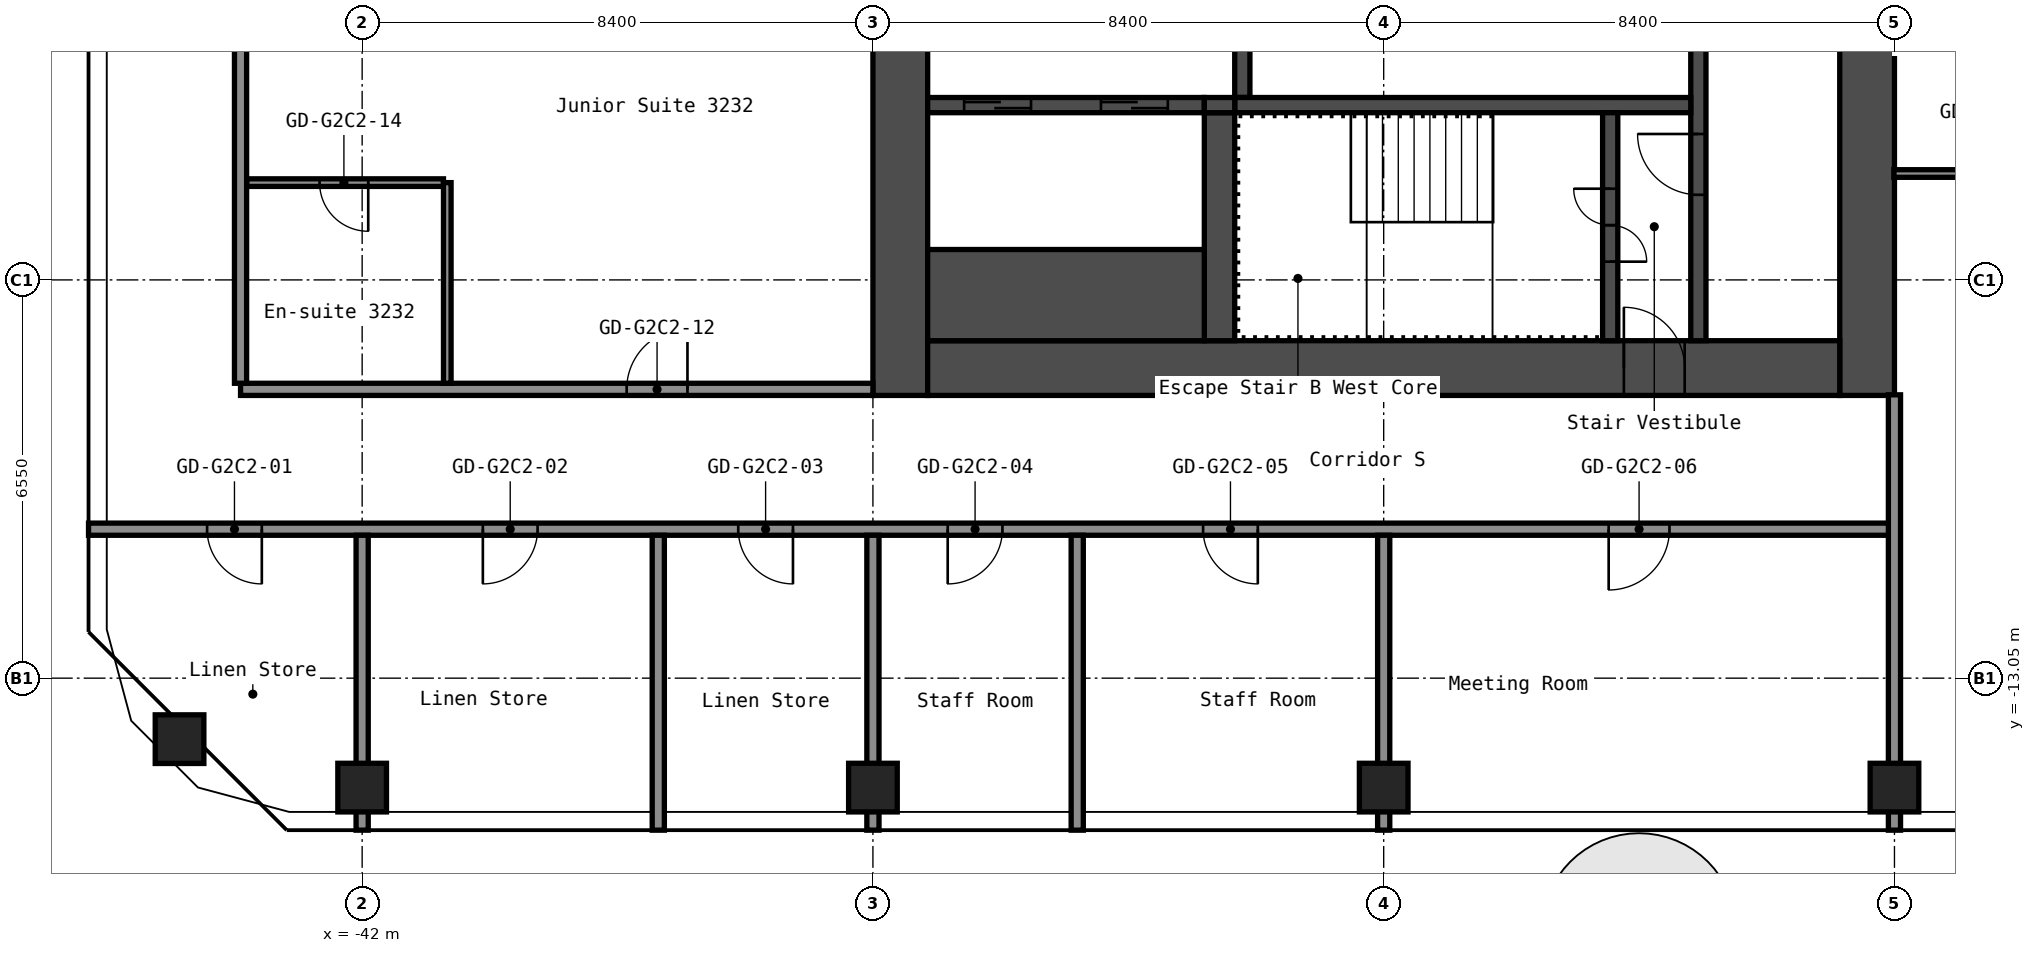
"""IFC4 building model, lengths in metres.
Left out: names, types, materials, properties, quantities, classifications, styles, units other than length and angle.
Written with IfcOpenShell. Run it as: python <this file> out.ifc"""

import sys

from ifc_helpers import new_model, si_unit, direction, frame, frame_2d, origin, origin_2d, place, context, subcontext, project, spatial, rectangle, hollow_rectangle, extrude, element, fill, save


model = new_model("IFC4")
c1 = context("Model", 3, precision=1e-05, world=origin(), true_north=direction((0.0, 1.0)))
c2 = subcontext(c1, "Body", "Model", "MODEL_VIEW")
j1 = project(units=[si_unit("LENGTHUNIT", "METRE"), si_unit("PLANEANGLEUNIT", "RADIAN")], contexts=[c1])
p1 = place(None, origin())
s1 = spatial("IfcSite", under=j1, at=p1, CompositionType="ELEMENT")
p2 = place(p1, origin())
s2 = spatial("IfcBuilding", under=s1, at=p2, CompositionType="ELEMENT")
p3 = place(p2, frame((0.0, 0.0, 113.8)))
s3 = spatial("IfcBuildingStorey", under=s2, at=p3, CompositionType="ELEMENT", Elevation=113.8)
for number, where, z_axis, x_axis in (
    (1, (-45.003, -14.053, 0.0), (0.0, 0.0, 1.0), (1.0, 0.0, 0.0)),
    (2, (-42.0, -14.85, 0.0), (0.0, 0.0, 1.0), (1.0, 0.0, 0.0)),
    (3, (-33.6, -14.85, 0.0), (0.0, 0.0, 1.0), (1.0, 0.0, 0.0)),
    (4, (-25.2, -14.85, 0.0), (0.0, 0.0, 1.0), (1.0, 0.0, 0.0)),
    (5, (-16.8, -14.85, 0.0), (0.0, 0.0, 1.0), (1.0, 0.0, 0.0)),
):
    element("IfcColumn", number, at=place(p3, frame(where, z_axis=z_axis, x_axis=x_axis)), inside=s3, PredefinedType="COLUMN", context=c2, shape_type="SweptSolid", body=[
        extrude(hollow_rectangle(XDim=0.8, YDim=0.8, WallThickness=0.032, at=origin_2d()), origin(), (0.0, 0.0, 1.0), 2.8),
    ])
p4 = place(p3, frame((-17.25, -8.4, 0.0), z_axis=(0.0, 0.0, 1.0), x_axis=(0.0, 1.0, 0.0)))
e6 = element("IfcWall", 6, at=p4, inside=s3, PredefinedType="SHEAR", context=c2, shape_type="SweptSolid", body=[
    extrude(rectangle(XDim=16.8, YDim=0.9, at=frame_2d((8.4, 0.0))), origin(), (0.0, 0.0, 1.0), 2.8),
])
p5 = place(p4, frame((7.6, 0.0, 0.0)))
e7 = element("IfcOpeningElement", 7, at=p5, cuts=e6, PredefinedType="OPENING", context=c2, shape_type="SweptSolid", body=[
    extrude(rectangle(XDim=1.2, YDim=2.1, at=frame_2d((0.6, 1.05))), frame((0.0, 0.46, 0.0), z_axis=(0.0, -1.0, 0.0), x_axis=(1.0, 0.0, 0.0)), (0.0, 0.0, 1.0), 0.92),
])
p6 = place(p3, frame((-33.15, -8.4, 0.0), z_axis=(0.0, 0.0, 1.0), x_axis=(0.0, 1.0, 0.0)))
e8 = element("IfcWall", 8, at=p6, inside=s3, PredefinedType="SHEAR", context=c2, shape_type="SweptSolid", body=[
    extrude(rectangle(XDim=16.8, YDim=0.9, at=frame_2d((8.4, 0.0))), origin(), (0.0, 0.0, 1.0), 2.8),
])
p7 = place(p3, frame((-32.7, -7.95, 0.0), z_axis=(0.0, 0.0, 1.0), x_axis=(1.0, 0.0, 0.0)))
e9 = element("IfcWall", 9, at=p7, inside=s3, PredefinedType="SHEAR", context=c2, shape_type="SweptSolid", body=[
    extrude(rectangle(XDim=15.0, YDim=0.9, at=frame_2d((7.5, 0.0))), origin(), (0.0, 0.0, 1.0), 2.8),
])
p8 = place(p7, frame((11.45, 0.0, 0.0)))
e10 = element("IfcOpeningElement", 10, at=p8, cuts=e9, PredefinedType="OPENING", context=c2, shape_type="SweptSolid", body=[
    extrude(rectangle(XDim=1.0, YDim=2.1, at=frame_2d((0.5, 1.05))), frame((0.0, 0.46, 0.0), z_axis=(0.0, -1.0, 0.0), x_axis=(1.0, 0.0, 0.0)), (0.0, 0.0, 1.0), 0.92),
])
p9 = place(p3, frame((-20.025, -7.5, 0.0), z_axis=(0.0, 0.0, 1.0), x_axis=(0.0, 1.0, 0.0)))
e11 = element("IfcWall", 11, at=p9, inside=s3, PredefinedType="SHEAR", context=c2, shape_type="SweptSolid", body=[
    extrude(rectangle(XDim=6.3, YDim=0.25, at=frame_2d((3.15, 0.0))), origin(), (0.0, 0.0, 1.0), 2.8),
])
p10 = place(p9, frame((2.4, 0.0, 0.0)))
e12 = element("IfcOpeningElement", 12, at=p10, cuts=e11, PredefinedType="OPENING", context=c2, shape_type="SweptSolid", body=[
    extrude(rectangle(XDim=1.0, YDim=2.1, at=frame_2d((0.5, 1.05))), frame((0.0, 0.135, 0.0), z_axis=(0.0, -1.0, 0.0), x_axis=(1.0, 0.0, 0.0)), (0.0, 0.0, 1.0), 0.27),
])
p11 = place(p3, frame((-27.525, -3.5, 0.0), z_axis=(0.0, 0.0, 1.0), x_axis=(0.0, 1.0, 0.0)))
e13 = element("IfcWall", 13, at=p11, inside=s3, PredefinedType="SHEAR", context=c2, shape_type="SweptSolid", body=[
    extrude(rectangle(XDim=2.05, YDim=0.25, at=frame_2d((1.025, 0.0))), origin(), (0.0, 0.0, 1.0), 2.8),
])
p12 = place(p3, frame((-27.65, -3.625, 0.0), z_axis=(0.0, 0.0, 1.0), x_axis=(1.0, 0.0, 0.0)))
e14 = element("IfcWall", 14, at=p12, inside=s3, PredefinedType="SHEAR", context=c2, shape_type="SweptSolid", body=[
    extrude(rectangle(XDim=7.5, YDim=0.25, at=frame_2d((3.75, 0.0))), origin(), (0.0, 0.0, 1.0), 2.8),
])
p13 = place(p3, frame((-21.475, -7.5, 0.0), z_axis=(0.0, 0.0, 1.0), x_axis=(0.0, 1.0, 0.0)))
e15 = element("IfcWall", 15, at=p13, inside=s3, PredefinedType="SHEAR", context=c2, shape_type="SweptSolid", body=[
    extrude(rectangle(XDim=3.75, YDim=0.25, at=frame_2d((1.875, 0.0))), origin(), (0.0, 0.0, 1.0), 2.8),
])
p14 = place(p13, frame((1.3, 0.0, 0.0)))
e16 = element("IfcOpeningElement", 16, at=p14, cuts=e15, PredefinedType="OPENING", context=c2, shape_type="SweptSolid", body=[
    extrude(rectangle(XDim=1.2, YDim=2.1, at=frame_2d((0.6, 1.05))), frame((0.0, 0.135, 0.0), z_axis=(0.0, -1.0, 0.0), x_axis=(1.0, 0.0, 0.0)), (0.0, 0.0, 1.0), 0.27),
])
p15 = place(p3, frame((-27.9, -7.5, 0.0), z_axis=(0.0, 0.0, 1.0), x_axis=(0.0, 1.0, 0.0)))
e17 = element("IfcWall", 17, at=p15, inside=s3, PredefinedType="SHEAR", context=c2, shape_type="SweptSolid", body=[
    extrude(rectangle(XDim=3.75, YDim=0.5, at=frame_2d((1.875, 0.0))), origin(), (0.0, 0.0, 1.0), 2.8),
])
p16 = place(p3, frame((-32.7, -3.625, 0.0), z_axis=(0.0, 0.0, 1.0), x_axis=(1.0, 0.0, 0.0)))
e18 = element("IfcWall", 18, at=p16, inside=s3, PredefinedType="SHEAR", context=c2, shape_type="SweptSolid", body=[
    extrude(rectangle(XDim=4.55, YDim=0.25, at=frame_2d((2.275, 0.0))), origin(), (0.0, 0.0, 1.0), 2.8),
])
p17 = place(p16, frame((2.85, 0.0, 0.0)))
e19 = element("IfcOpeningElement", 19, at=p17, cuts=e18, PredefinedType="OPENING", context=c2, shape_type="SweptSolid", body=[
    extrude(rectangle(XDim=1.1, YDim=2.1, at=frame_2d((0.55, 1.05))), frame((0.0, 0.135, 0.0), z_axis=(0.0, -1.0, 0.0), x_axis=(1.0, 0.0, 0.0)), (0.0, 0.0, 1.0), 0.27),
])
p18 = place(p16, frame((0.6, 0.0, 0.0)))
e20 = element("IfcOpeningElement", 20, at=p18, cuts=e18, PredefinedType="OPENING", context=c2, shape_type="SweptSolid", body=[
    extrude(rectangle(XDim=1.1, YDim=2.1, at=frame_2d((0.55, 1.05))), frame((0.0, 0.135, 0.0), z_axis=(0.0, -1.0, 0.0), x_axis=(1.0, 0.0, 0.0)), (0.0, 0.0, 1.0), 0.27),
])
p19 = place(p3, frame((-32.7, -6.75, 0.0), z_axis=(0.0, 0.0, 1.0), x_axis=(1.0, 0.0, 0.0)))
e21 = element("IfcWall", 21, at=p19, inside=s3, PredefinedType="SHEAR", context=c2, shape_type="SweptSolid", body=[
    extrude(rectangle(XDim=4.55, YDim=1.5, at=frame_2d((2.275, 0.0))), origin(), (0.0, 0.0, 1.0), 2.8),
])
p20 = place(p3, frame((-28.15, -3.625, 0.0), z_axis=(0.0, 0.0, 1.0), x_axis=(1.0, 0.0, 0.0)))
e22 = element("IfcWall", 22, at=p20, inside=s3, PredefinedType="SHEAR", context=c2, shape_type="SweptSolid", body=[
    extrude(rectangle(XDim=0.5, YDim=0.25, at=frame_2d((0.25, 0.0))), origin(), (0.0, 0.0, 1.0), 2.8),
])
p21 = place(p3, frame((-46.5, -10.6, 0.0), z_axis=(0.0, 0.0, 1.0), x_axis=(1.0, 0.0, 0.0)))
e23 = element("IfcWall", 23, at=p21, inside=s3, PredefinedType="PARTITIONING", context=c2, shape_type="SweptSolid", body=[
    extrude(rectangle(XDim=29.7, YDim=0.2, at=frame_2d((14.85, 0.0))), origin(), (0.0, 0.0, 1.0), 2.8),
])
p22 = place(p21, frame((1.95, 0.0, 0.0)))
e24 = element("IfcOpeningElement", 24, at=p22, cuts=e23, PredefinedType="OPENING", context=c2, shape_type="SweptSolid", body=[
    extrude(rectangle(XDim=0.9, YDim=2.1, at=frame_2d((0.45, 1.05))), frame((0.0, 0.11, 0.0), z_axis=(0.0, -1.0, 0.0), x_axis=(1.0, 0.0, 0.0)), (0.0, 0.0, 1.0), 0.22),
])
p23 = place(p21, frame((6.485, 0.0, 0.0)))
e25 = element("IfcOpeningElement", 25, at=p23, cuts=e23, PredefinedType="OPENING", context=c2, shape_type="SweptSolid", body=[
    extrude(rectangle(XDim=0.9, YDim=2.1, at=frame_2d((0.45, 1.05))), frame((0.0, 0.11, 0.0), z_axis=(0.0, -1.0, 0.0), x_axis=(1.0, 0.0, 0.0)), (0.0, 0.0, 1.0), 0.22),
])
p24 = place(p21, frame((10.685, 0.0, 0.0)))
e26 = element("IfcOpeningElement", 26, at=p24, cuts=e23, PredefinedType="OPENING", context=c2, shape_type="SweptSolid", body=[
    extrude(rectangle(XDim=0.9, YDim=2.1, at=frame_2d((0.45, 1.05))), frame((0.0, 0.11, 0.0), z_axis=(0.0, -1.0, 0.0), x_axis=(1.0, 0.0, 0.0)), (0.0, 0.0, 1.0), 0.22),
])
p25 = place(p21, frame((14.13, 0.0, 0.0)))
e27 = element("IfcOpeningElement", 27, at=p25, cuts=e23, PredefinedType="OPENING", context=c2, shape_type="SweptSolid", body=[
    extrude(rectangle(XDim=0.9, YDim=2.1, at=frame_2d((0.45, 1.05))), frame((0.0, 0.11, 0.0), z_axis=(0.0, -1.0, 0.0), x_axis=(1.0, 0.0, 0.0)), (0.0, 0.0, 1.0), 0.22),
])
p26 = place(p21, frame((18.33, 0.0, 0.0)))
e28 = element("IfcOpeningElement", 28, at=p26, cuts=e23, PredefinedType="OPENING", context=c2, shape_type="SweptSolid", body=[
    extrude(rectangle(XDim=0.9, YDim=2.1, at=frame_2d((0.45, 1.05))), frame((0.0, 0.11, 0.0), z_axis=(0.0, -1.0, 0.0), x_axis=(1.0, 0.0, 0.0)), (0.0, 0.0, 1.0), 0.22),
])
p27 = place(p21, frame((25.0, 0.0, 0.0)))
e29 = element("IfcOpeningElement", 29, at=p27, cuts=e23, PredefinedType="OPENING", context=c2, shape_type="SweptSolid", body=[
    extrude(rectangle(XDim=1.0, YDim=2.1, at=frame_2d((0.5, 1.05))), frame((0.0, 0.11, 0.0), z_axis=(0.0, -1.0, 0.0), x_axis=(1.0, 0.0, 0.0)), (0.0, 0.0, 1.0), 0.22),
])
p28 = place(p3, frame((-44.0, -8.3, 0.0), z_axis=(0.0, 0.0, 1.0), x_axis=(1.0, 0.0, 0.0)))
e30 = element("IfcWall", 30, at=p28, inside=s3, PredefinedType="PARTITIONING", context=c2, shape_type="SweptSolid", body=[
    extrude(rectangle(XDim=10.4, YDim=0.2, at=frame_2d((5.2, 0.0))), origin(), (0.0, 0.0, 1.0), 2.8),
])
p29 = place(p28, frame((6.35, 0.0, 0.0)))
e31 = element("IfcOpeningElement", 31, at=p29, cuts=e30, PredefinedType="OPENING", context=c2, shape_type="SweptSolid", body=[
    extrude(rectangle(XDim=1.0, YDim=2.1, at=frame_2d((0.5, 1.05))), frame((0.0, 0.11, 0.0), z_axis=(0.0, -1.0, 0.0), x_axis=(1.0, 0.0, 0.0)), (0.0, 0.0, 1.0), 0.22),
])
p30 = place(p3, frame((-43.9, -4.9, 0.0), z_axis=(0.0, 0.0, 1.0), x_axis=(1.0, 0.0, 0.0)))
e32 = element("IfcWall", 32, at=p30, inside=s3, PredefinedType="PARTITIONING", context=c2, shape_type="SweptSolid", body=[
    extrude(rectangle(XDim=3.237, YDim=0.125, at=frame_2d((1.619, 0.0))), origin(), (0.0, 0.0, 1.0), 2.8),
])
p31 = place(p30, frame((1.2, 0.0, 0.0)))
e33 = element("IfcOpeningElement", 33, at=p31, cuts=e32, PredefinedType="OPENING", context=c2, shape_type="SweptSolid", body=[
    extrude(rectangle(XDim=0.8, YDim=2.1, at=frame_2d((0.4, 1.05))), frame((0.0, 0.073, 0.0), z_axis=(0.0, -1.0, 0.0), x_axis=(1.0, 0.0, 0.0)), (0.0, 0.0, 1.0), 0.145),
])
p32 = place(p3, frame((-16.81, -4.75, 0.0), z_axis=(0.0, 0.0, 1.0), x_axis=(1.0, 0.0, 0.0)))
e34 = element("IfcWall", 34, at=p32, inside=s3, PredefinedType="PARTITIONING", context=c2, shape_type="SweptSolid", body=[
    extrude(rectangle(XDim=3.348, YDim=0.125, at=frame_2d((1.674, 0.0))), origin(), (0.0, 0.0, 1.0), 2.8),
])
p33 = place(p32, frame((1.31, 0.0, 0.0)))
e35 = element("IfcOpeningElement", 35, at=p33, cuts=e34, PredefinedType="OPENING", context=c2, shape_type="SweptSolid", body=[
    extrude(rectangle(XDim=0.8, YDim=2.1, at=frame_2d((0.4, 1.05))), frame((0.0, 0.073, 0.0), z_axis=(0.0, -1.0, 0.0), x_axis=(1.0, 0.0, 0.0)), (0.0, 0.0, 1.0), 0.145),
])
p34 = place(p3, frame((-44.0, -8.2, 0.0), z_axis=(0.0, 0.0, 1.0), x_axis=(0.0, 1.0, 0.0)))
e36 = element("IfcWall", 36, at=p34, inside=s3, PredefinedType="PARTITIONING", context=c2, shape_type="SweptSolid", body=[
    extrude(rectangle(XDim=16.4, YDim=0.2, at=frame_2d((8.2, 0.0))), origin(), (0.0, 0.0, 1.0), 2.8),
])
p35 = place(p3, frame((-42.0, -15.55, 0.0), z_axis=(0.0, 0.0, 1.0), x_axis=(0.0, 1.0, 0.0)))
e37 = element("IfcWall", 37, at=p35, inside=s3, PredefinedType="PARTITIONING", context=c2, shape_type="SweptSolid", body=[
    extrude(rectangle(XDim=4.85, YDim=0.2, at=frame_2d((2.425, 0.0))), origin(), (0.0, 0.0, 1.0), 2.8),
])
p36 = place(p3, frame((-40.6, -8.2, 0.0), z_axis=(0.0, 0.0, 1.0), x_axis=(0.0, 1.0, 0.0)))
e38 = element("IfcWall", 38, at=p36, inside=s3, PredefinedType="PARTITIONING", context=c2, shape_type="SweptSolid", body=[
    extrude(rectangle(XDim=3.3, YDim=0.125, at=frame_2d((1.65, 0.0))), origin(), (0.0, 0.0, 1.0), 2.8),
])
for number, where, z_axis, x_axis in (
    (39, (-37.13, -15.55, 0.0), (0.0, 0.0, 1.0), (0.0, 1.0, 0.0)),
    (40, (-33.6, -15.55, 0.0), (0.0, 0.0, 1.0), (0.0, 1.0, 0.0)),
    (41, (-30.24, -15.55, 0.0), (0.0, 0.0, 1.0), (0.0, 1.0, 0.0)),
    (42, (-25.2, -15.55, 0.0), (0.0, 0.0, 1.0), (0.0, 1.0, 0.0)),
):
    element("IfcWall", number, at=place(p3, frame(where, z_axis=z_axis, x_axis=x_axis)), inside=s3, PredefinedType="PARTITIONING", context=c2, shape_type="SweptSolid", body=[
        extrude(rectangle(XDim=4.85, YDim=0.2, at=frame_2d((2.425, 0.0))), origin(), (0.0, 0.0, 1.0), 2.8),
    ])
p37 = place(p3, frame((-16.8, -15.55, 0.0), z_axis=(0.0, 0.0, 1.0), x_axis=(0.0, 1.0, 0.0)))
e43 = element("IfcWall", 43, at=p37, inside=s3, PredefinedType="PARTITIONING", context=c2, shape_type="SweptSolid", body=[
    extrude(rectangle(XDim=7.16, YDim=0.2, at=frame_2d((3.58, 0.0))), origin(), (0.0, 0.0, 1.0), 2.8),
])
p38 = place(p8, origin())
e44 = element("IfcDoor", 44, at=p38, inside=s3, OperationType="SINGLE_SWING_RIGHT", PredefinedType="DOOR", context=c2, shape_type="SweptSolid", body=[
    extrude(rectangle(XDim=1.0, YDim=2.1, at=frame_2d((0.5, 1.05))), frame((0.0, 0.025, 0.0), z_axis=(0.0, -1.0, 0.0), x_axis=(1.0, 0.0, 0.0)), (0.0, 0.0, 1.0), 0.05),
])
fill(e10, e44)
p39 = place(p14, origin())
e45 = element("IfcDoor", 45, at=p39, inside=s3, OperationType="DOUBLE_DOOR_SINGLE_SWING", PredefinedType="DOOR", context=c2, shape_type="SweptSolid", body=[
    extrude(rectangle(XDim=1.2, YDim=2.1, at=frame_2d((0.6, 1.05))), frame((0.0, 0.025, 0.0), z_axis=(0.0, -1.0, 0.0), x_axis=(1.0, 0.0, 0.0)), (0.0, 0.0, 1.0), 0.05),
])
fill(e16, e45)
p40 = place(p10, origin())
e46 = element("IfcDoor", 46, at=p40, inside=s3, OperationType="SINGLE_SWING_LEFT", PredefinedType="DOOR", context=c2, shape_type="SweptSolid", body=[
    extrude(rectangle(XDim=1.0, YDim=2.1, at=frame_2d((0.5, 1.05))), frame((0.0, 0.025, 0.0), z_axis=(0.0, -1.0, 0.0), x_axis=(1.0, 0.0, 0.0)), (0.0, 0.0, 1.0), 0.05),
])
fill(e12, e46)
p41 = place(p17, origin())
e47 = element("IfcDoor", 47, at=p41, inside=s3, OperationType="DOUBLE_DOOR_SLIDING", PredefinedType="DOOR", context=c2, shape_type="SweptSolid", body=[
    extrude(rectangle(XDim=1.1, YDim=2.1, at=frame_2d((0.55, 1.05))), frame((0.0, 0.025, 0.0), z_axis=(0.0, -1.0, 0.0), x_axis=(1.0, 0.0, 0.0)), (0.0, 0.0, 1.0), 0.05),
])
fill(e19, e47)
p42 = place(p18, origin())
e48 = element("IfcDoor", 48, at=p42, inside=s3, OperationType="DOUBLE_DOOR_SLIDING", PredefinedType="DOOR", context=c2, shape_type="SweptSolid", body=[
    extrude(rectangle(XDim=1.1, YDim=2.1, at=frame_2d((0.55, 1.05))), frame((0.0, 0.025, 0.0), z_axis=(0.0, -1.0, 0.0), x_axis=(1.0, 0.0, 0.0)), (0.0, 0.0, 1.0), 0.05),
])
fill(e20, e48)
p43 = place(p22, origin())
e49 = element("IfcDoor", 49, at=p43, inside=s3, OperationType="SINGLE_SWING_RIGHT", PredefinedType="DOOR", context=c2, shape_type="SweptSolid", body=[
    extrude(rectangle(XDim=0.9, YDim=2.1, at=frame_2d((0.45, 1.05))), frame((0.0, 0.025, 0.0), z_axis=(0.0, -1.0, 0.0), x_axis=(1.0, 0.0, 0.0)), (0.0, 0.0, 1.0), 0.05),
])
fill(e24, e49)
p44 = place(p23, origin())
e50 = element("IfcDoor", 50, at=p44, inside=s3, OperationType="SINGLE_SWING_LEFT", PredefinedType="DOOR", context=c2, shape_type="SweptSolid", body=[
    extrude(rectangle(XDim=0.9, YDim=2.1, at=frame_2d((0.45, 1.05))), frame((0.0, 0.025, 0.0), z_axis=(0.0, -1.0, 0.0), x_axis=(1.0, 0.0, 0.0)), (0.0, 0.0, 1.0), 0.05),
])
fill(e25, e50)
p45 = place(p24, origin())
e51 = element("IfcDoor", 51, at=p45, inside=s3, OperationType="SINGLE_SWING_RIGHT", PredefinedType="DOOR", context=c2, shape_type="SweptSolid", body=[
    extrude(rectangle(XDim=0.9, YDim=2.1, at=frame_2d((0.45, 1.05))), frame((0.0, 0.025, 0.0), z_axis=(0.0, -1.0, 0.0), x_axis=(1.0, 0.0, 0.0)), (0.0, 0.0, 1.0), 0.05),
])
fill(e26, e51)
p46 = place(p25, origin())
e52 = element("IfcDoor", 52, at=p46, inside=s3, OperationType="SINGLE_SWING_LEFT", PredefinedType="DOOR", context=c2, shape_type="SweptSolid", body=[
    extrude(rectangle(XDim=0.9, YDim=2.1, at=frame_2d((0.45, 1.05))), frame((0.0, 0.025, 0.0), z_axis=(0.0, -1.0, 0.0), x_axis=(1.0, 0.0, 0.0)), (0.0, 0.0, 1.0), 0.05),
])
fill(e27, e52)
p47 = place(p26, origin())
e53 = element("IfcDoor", 53, at=p47, inside=s3, OperationType="SINGLE_SWING_RIGHT", PredefinedType="DOOR", context=c2, shape_type="SweptSolid", body=[
    extrude(rectangle(XDim=0.9, YDim=2.1, at=frame_2d((0.45, 1.05))), frame((0.0, 0.025, 0.0), z_axis=(0.0, -1.0, 0.0), x_axis=(1.0, 0.0, 0.0)), (0.0, 0.0, 1.0), 0.05),
])
fill(e28, e53)
p48 = place(p27, origin())
e54 = element("IfcDoor", 54, at=p48, inside=s3, OperationType="SINGLE_SWING_LEFT", PredefinedType="DOOR", context=c2, shape_type="SweptSolid", body=[
    extrude(rectangle(XDim=1.0, YDim=2.1, at=frame_2d((0.5, 1.05))), frame((0.0, 0.025, 0.0), z_axis=(0.0, -1.0, 0.0), x_axis=(1.0, 0.0, 0.0)), (0.0, 0.0, 1.0), 0.05),
])
fill(e29, e54)
p49 = place(p29, origin())
e55 = element("IfcDoor", 55, at=p49, inside=s3, OperationType="SINGLE_SWING_LEFT", PredefinedType="DOOR", context=c2, shape_type="SweptSolid", body=[
    extrude(rectangle(XDim=1.0, YDim=2.1, at=frame_2d((0.5, 1.05))), frame((0.0, 0.025, 0.0), z_axis=(0.0, -1.0, 0.0), x_axis=(1.0, 0.0, 0.0)), (0.0, 0.0, 1.0), 0.05),
])
fill(e31, e55)
p50 = place(p31, origin())
e56 = element("IfcDoor", 56, at=p50, inside=s3, OperationType="SINGLE_SWING_RIGHT", PredefinedType="DOOR", context=c2, shape_type="SweptSolid", body=[
    extrude(rectangle(XDim=0.8, YDim=2.1, at=frame_2d((0.4, 1.05))), frame((0.0, 0.025, 0.0), z_axis=(0.0, -1.0, 0.0), x_axis=(1.0, 0.0, 0.0)), (0.0, 0.0, 1.0), 0.05),
])
fill(e33, e56)
save(model, sys.argv[1])
